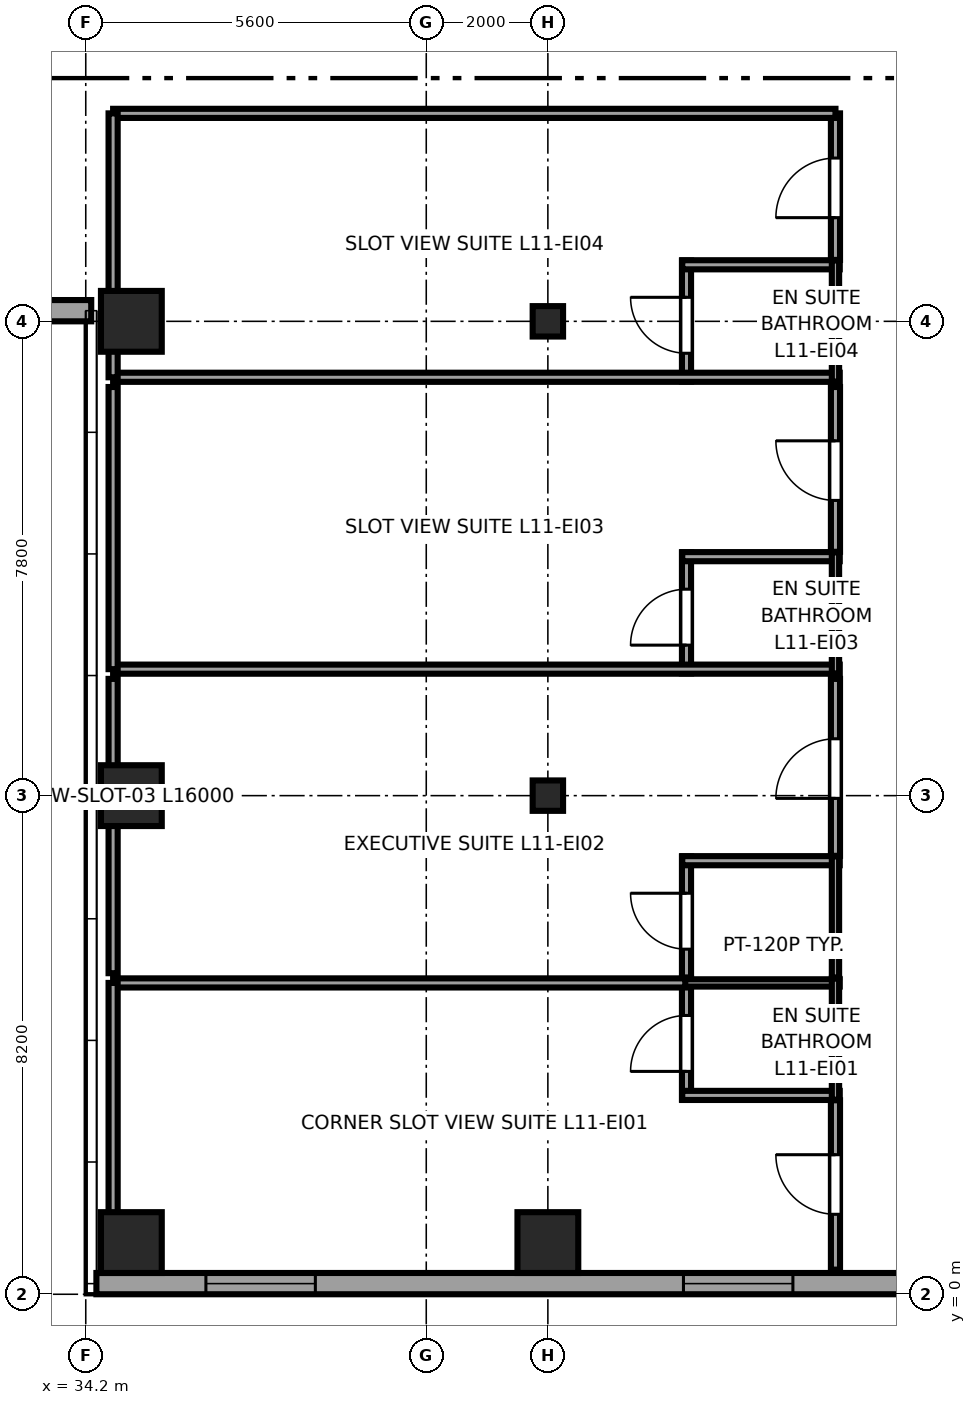
"""IFC4 building model, lengths in metres.
Left out: names, types, materials, properties, quantities, classifications, styles, units other than length and angle.
Written with IfcOpenShell. Run it as: python <this file> out.ifc"""

import sys

from ifc_helpers import new_model, si_unit, direction, frame, frame_2d, origin, origin_2d, place, context, subcontext, project, spatial, rectangle, i_section, extrude, source, transform, mapped, element, fill, save


model = new_model("IFC4")
c1 = context("Model", 3, precision=1e-05, world=origin(), true_north=direction((0.0, 1.0)))
c2 = subcontext(c1, "Body", "Model", "MODEL_VIEW")
j1 = project(units=[si_unit("LENGTHUNIT", "METRE"), si_unit("PLANEANGLEUNIT", "RADIAN")], contexts=[c1])
p1 = place(None, origin())
s1 = spatial("IfcSite", under=j1, at=p1, CompositionType="ELEMENT")
p2 = place(p1, origin())
s2 = spatial("IfcBuilding", under=s1, at=p2, CompositionType="ELEMENT")
p3 = place(p2, frame((0.0, 0.0, 49.75)))
s3 = spatial("IfcBuildingStorey", under=s2, at=p3, CompositionType="ELEMENT", Elevation=49.75)
m1 = source(origin(), c2, "Body", "SweptSolid", [
    extrude(rectangle(XDim=1.0, YDim=1.0, at=origin_2d()), origin(), (0.0, 0.0, 1.0), 3.55),
])
for number, where, z_axis, x_axis in (
    (1, (34.95, 0.85, 0.0), (0.0, 0.0, 1.0), (1.0, 0.0, 0.0)),
    (2, (34.95, 8.2, 0.0), (0.0, 0.0, 1.0), (1.0, 0.0, 0.0)),
    (3, (34.95, 16.0, 0.0), (0.0, 0.0, 1.0), (1.0, 0.0, 0.0)),
    (4, (41.8, 0.85, 0.0), (0.0, 0.0, 1.0), (1.0, 0.0, 0.0)),
):
    element("IfcColumn", number, at=place(p3, frame(where, z_axis=z_axis, x_axis=x_axis)), inside=s3, PredefinedType="COLUMN", context=c2, shape_type="MappedRepresentation", body=[
        mapped(m1, transform((0.0, 0.0, 0.0), x_axis=(1.0, 0.0, 0.0), y_axis=(0.0, 1.0, 0.0), z_axis=(0.0, 0.0, 1.0), scale=1.0)),
    ])
m2 = source(origin(), c2, "Body", "SweptSolid", [
    extrude(i_section(OverallWidth=0.5, OverallDepth=0.5, WebThickness=0.028, FlangeThickness=0.045, at=origin_2d()), origin(), (0.0, 0.0, 1.0), 3.55),
])
for number, where, z_axis, x_axis in (
    (5, (41.8, 8.2, 0.0), (0.0, 0.0, 1.0), (1.0, 0.0, 0.0)),
    (6, (41.8, 16.0, 0.0), (0.0, 0.0, 1.0), (1.0, 0.0, 0.0)),
):
    element("IfcColumn", number, at=place(p3, frame(where, z_axis=z_axis, x_axis=x_axis)), inside=s3, PredefinedType="COLUMN", context=c2, shape_type="MappedRepresentation", body=[
        mapped(m2, transform((0.0, 0.0, 0.0), x_axis=(1.0, 0.0, 0.0), y_axis=(0.0, 1.0, 0.0), z_axis=(0.0, 0.0, 1.0), scale=1.0)),
    ])
p4 = place(p3, frame((22.71, 16.175, 0.0), z_axis=(0.0, 0.0, 1.0), x_axis=(1.0, 0.0, 0.0)))
e7 = element("IfcWall", 7, at=p4, inside=s3, PredefinedType="SOLIDWALL", context=c2, shape_type="SweptSolid", body=[
    extrude(rectangle(XDim=11.58, YDim=0.35, at=frame_2d((5.79, 0.0))), origin(), (0.0, 0.0, 1.0), 2.748),
])
p5 = place(p4, frame((2.295, 0.0, 0.68)))
e8 = element("IfcOpeningElement", 8, at=p5, cuts=e7, PredefinedType="OPENING", context=c2, shape_type="SweptSolid", body=[
    extrude(rectangle(XDim=1.8, YDim=1.85, at=frame_2d((0.9, 0.925))), frame((0.0, 0.185, 0.0), z_axis=(0.0, -1.0, 0.0), x_axis=(1.0, 0.0, 0.0)), (0.0, 0.0, 1.0), 0.37),
])
p6 = place(p4, frame((7.485, 0.0, 0.68)))
e9 = element("IfcOpeningElement", 9, at=p6, cuts=e7, PredefinedType="OPENING", context=c2, shape_type="SweptSolid", body=[
    extrude(rectangle(XDim=1.8, YDim=1.85, at=frame_2d((0.9, 0.925))), frame((0.0, 0.185, 0.0), z_axis=(0.0, -1.0, 0.0), x_axis=(1.0, 0.0, 0.0)), (0.0, 0.0, 1.0), 0.37),
])
p7 = place(p3, frame((34.375, 0.175, 0.0), z_axis=(0.0, 0.0, 1.0), x_axis=(1.0, 0.0, 0.0)))
e10 = element("IfcWall", 10, at=p7, inside=s3, PredefinedType="SOLIDWALL", context=c2, shape_type="SweptSolid", body=[
    extrude(rectangle(XDim=18.008, YDim=0.35, at=frame_2d((9.004, 0.0))), origin(), (0.0, 0.0, 1.0), 3.37),
])
p8 = place(p7, frame((1.801, 0.0, 0.68)))
e11 = element("IfcOpeningElement", 11, at=p8, cuts=e10, PredefinedType="OPENING", context=c2, shape_type="SweptSolid", body=[
    extrude(rectangle(XDim=1.8, YDim=1.85, at=frame_2d((0.9, 0.925))), frame((0.0, 0.185, 0.0), z_axis=(0.0, -1.0, 0.0), x_axis=(1.0, 0.0, 0.0)), (0.0, 0.0, 1.0), 0.37),
])
p9 = place(p7, frame((9.655, 0.0, 0.68)))
e12 = element("IfcOpeningElement", 12, at=p9, cuts=e10, PredefinedType="OPENING", context=c2, shape_type="SweptSolid", body=[
    extrude(rectangle(XDim=1.8, YDim=1.85, at=frame_2d((0.9, 0.925))), frame((0.0, 0.185, 0.0), z_axis=(0.0, -1.0, 0.0), x_axis=(1.0, 0.0, 0.0)), (0.0, 0.0, 1.0), 0.37),
])
p10 = place(p7, frame((15.725, 0.0, 0.62)))
e13 = element("IfcOpeningElement", 13, at=p10, cuts=e10, PredefinedType="OPENING", context=c2, shape_type="SweptSolid", body=[
    extrude(rectangle(XDim=1.5, YDim=1.55, at=frame_2d((0.75, 0.775))), frame((0.0, 0.185, 0.0), z_axis=(0.0, -1.0, 0.0), x_axis=(1.0, 0.0, 0.0)), (0.0, 0.0, 1.0), 0.37),
])
p11 = place(p3, frame((44.08, 3.2, 0.0), z_axis=(0.0, 0.0, 1.0), x_axis=(0.0, 1.0, 0.0)))
e14 = element("IfcWall", 14, at=p11, inside=s3, PredefinedType="PARTITIONING", context=c2, shape_type="SweptSolid", body=[
    extrude(rectangle(XDim=1.99, YDim=0.15, at=frame_2d((0.995, 0.0))), origin(), (0.0, 0.0, 1.0), 3.37),
])
p12 = place(p11, frame((0.465, 0.0, 0.0)))
e15 = element("IfcOpeningElement", 15, at=p12, cuts=e14, PredefinedType="OPENING", context=c2, shape_type="SweptSolid", body=[
    extrude(rectangle(XDim=0.92, YDim=2.01, at=frame_2d((0.46, 1.005))), frame((0.0, 0.085, 0.0), z_axis=(0.0, -1.0, 0.0), x_axis=(1.0, 0.0, 0.0)), (0.0, 0.0, 1.0), 0.17),
])
p13 = place(p3, frame((44.01, 3.27, 0.0), z_axis=(0.0, 0.0, 1.0), x_axis=(1.0, 0.0, 0.0)))
e16 = element("IfcWall", 16, at=p13, inside=s3, PredefinedType="PARTITIONING", context=c2, shape_type="SweptSolid", body=[
    extrude(rectangle(XDim=2.59, YDim=0.15, at=frame_2d((1.295, 0.0))), origin(), (0.0, 0.0, 1.0), 3.37),
])
p14 = place(p3, frame((44.01, 5.12, 0.0), z_axis=(0.0, 0.0, 1.0), x_axis=(1.0, 0.0, 0.0)))
e17 = element("IfcWall", 17, at=p14, inside=s3, PredefinedType="PLUMBINGWALL", context=c2, shape_type="SweptSolid", body=[
    extrude(rectangle(XDim=2.59, YDim=0.12, at=frame_2d((1.295, 0.0))), origin(), (0.0, 0.0, 1.0), 3.37),
])
p15 = place(p3, frame((46.53, 3.2, 0.0), z_axis=(0.0, 0.0, 1.0), x_axis=(0.0, 1.0, 0.0)))
e18 = element("IfcWall", 18, at=p15, inside=s3, PredefinedType="PLUMBINGWALL", context=c2, shape_type="SweptSolid", body=[
    extrude(rectangle(XDim=1.99, YDim=0.12, at=frame_2d((0.995, 0.0))), origin(), (0.0, 0.0, 1.0), 3.37),
])
p16 = place(p3, frame((44.08, 5.21, 0.0), z_axis=(0.0, 0.0, 1.0), x_axis=(0.0, 1.0, 0.0)))
e19 = element("IfcWall", 19, at=p16, inside=s3, PredefinedType="PARTITIONING", context=c2, shape_type="SweptSolid", body=[
    extrude(rectangle(XDim=1.99, YDim=0.15, at=frame_2d((0.995, 0.0))), origin(), (0.0, 0.0, 1.0), 3.37),
])
p17 = place(p16, frame((0.465, 0.0, 0.0)))
e20 = element("IfcOpeningElement", 20, at=p17, cuts=e19, PredefinedType="OPENING", context=c2, shape_type="SweptSolid", body=[
    extrude(rectangle(XDim=0.92, YDim=2.01, at=frame_2d((0.46, 1.005))), frame((0.0, 0.085, 0.0), z_axis=(0.0, -1.0, 0.0), x_axis=(1.0, 0.0, 0.0)), (0.0, 0.0, 1.0), 0.17),
])
p18 = place(p3, frame((44.01, 7.13, 0.0), z_axis=(0.0, 0.0, 1.0), x_axis=(1.0, 0.0, 0.0)))
e21 = element("IfcWall", 21, at=p18, inside=s3, PredefinedType="PARTITIONING", context=c2, shape_type="SweptSolid", body=[
    extrude(rectangle(XDim=2.59, YDim=0.15, at=frame_2d((1.295, 0.0))), origin(), (0.0, 0.0, 1.0), 3.37),
])
p19 = place(p3, frame((46.53, 5.21, 0.0), z_axis=(0.0, 0.0, 1.0), x_axis=(0.0, 1.0, 0.0)))
e22 = element("IfcWall", 22, at=p19, inside=s3, PredefinedType="PLUMBINGWALL", context=c2, shape_type="SweptSolid", body=[
    extrude(rectangle(XDim=1.99, YDim=0.12, at=frame_2d((0.995, 0.0))), origin(), (0.0, 0.0, 1.0), 3.37),
])
p20 = place(p3, frame((44.08, 10.21, 0.0), z_axis=(0.0, 0.0, 1.0), x_axis=(0.0, 1.0, 0.0)))
e23 = element("IfcWall", 23, at=p20, inside=s3, PredefinedType="PARTITIONING", context=c2, shape_type="SweptSolid", body=[
    extrude(rectangle(XDim=1.99, YDim=0.15, at=frame_2d((0.995, 0.0))), origin(), (0.0, 0.0, 1.0), 3.37),
])
p21 = place(p20, frame((0.465, 0.0, 0.0)))
e24 = element("IfcOpeningElement", 24, at=p21, cuts=e23, PredefinedType="OPENING", context=c2, shape_type="SweptSolid", body=[
    extrude(rectangle(XDim=0.92, YDim=2.01, at=frame_2d((0.46, 1.005))), frame((0.0, 0.085, 0.0), z_axis=(0.0, -1.0, 0.0), x_axis=(1.0, 0.0, 0.0)), (0.0, 0.0, 1.0), 0.17),
])
p22 = place(p3, frame((34.65, 10.28, 0.0), z_axis=(0.0, 0.0, 1.0), x_axis=(1.0, 0.0, 0.0)))
e25 = element("IfcWall", 25, at=p22, inside=s3, PredefinedType="PARTITIONING", context=c2, shape_type="SweptSolid", body=[
    extrude(rectangle(XDim=11.95, YDim=0.15, at=frame_2d((5.975, 0.0))), origin(), (0.0, 0.0, 1.0), 3.37),
])
p23 = place(p3, frame((44.01, 12.13, 0.0), z_axis=(0.0, 0.0, 1.0), x_axis=(1.0, 0.0, 0.0)))
e26 = element("IfcWall", 26, at=p23, inside=s3, PredefinedType="PARTITIONING", context=c2, shape_type="SweptSolid", body=[
    extrude(rectangle(XDim=2.59, YDim=0.15, at=frame_2d((1.295, 0.0))), origin(), (0.0, 0.0, 1.0), 3.37),
])
p24 = place(p3, frame((46.53, 10.21, 0.0), z_axis=(0.0, 0.0, 1.0), x_axis=(0.0, 1.0, 0.0)))
e27 = element("IfcWall", 27, at=p24, inside=s3, PredefinedType="PLUMBINGWALL", context=c2, shape_type="SweptSolid", body=[
    extrude(rectangle(XDim=1.99, YDim=0.12, at=frame_2d((0.995, 0.0))), origin(), (0.0, 0.0, 1.0), 3.37),
])
p25 = place(p3, frame((44.08, 15.01, 0.0), z_axis=(0.0, 0.0, 1.0), x_axis=(0.0, 1.0, 0.0)))
e28 = element("IfcWall", 28, at=p25, inside=s3, PredefinedType="PARTITIONING", context=c2, shape_type="SweptSolid", body=[
    extrude(rectangle(XDim=1.99, YDim=0.15, at=frame_2d((0.995, 0.0))), origin(), (0.0, 0.0, 1.0), 3.37),
])
p26 = place(p25, frame((0.465, 0.0, 0.0)))
e29 = element("IfcOpeningElement", 29, at=p26, cuts=e28, PredefinedType="OPENING", context=c2, shape_type="SweptSolid", body=[
    extrude(rectangle(XDim=0.92, YDim=2.01, at=frame_2d((0.46, 1.005))), frame((0.0, 0.085, 0.0), z_axis=(0.0, -1.0, 0.0), x_axis=(1.0, 0.0, 0.0)), (0.0, 0.0, 1.0), 0.17),
])
p27 = place(p3, frame((34.65, 15.08, 0.0), z_axis=(0.0, 0.0, 1.0), x_axis=(1.0, 0.0, 0.0)))
e30 = element("IfcWall", 30, at=p27, inside=s3, PredefinedType="PARTITIONING", context=c2, shape_type="SweptSolid", body=[
    extrude(rectangle(XDim=11.95, YDim=0.15, at=frame_2d((5.975, 0.0))), origin(), (0.0, 0.0, 1.0), 3.37),
])
p28 = place(p3, frame((44.01, 16.93, 0.0), z_axis=(0.0, 0.0, 1.0), x_axis=(1.0, 0.0, 0.0)))
e31 = element("IfcWall", 31, at=p28, inside=s3, PredefinedType="PARTITIONING", context=c2, shape_type="SweptSolid", body=[
    extrude(rectangle(XDim=2.59, YDim=0.15, at=frame_2d((1.295, 0.0))), origin(), (0.0, 0.0, 1.0), 3.37),
])
p29 = place(p3, frame((46.53, 15.01, 0.0), z_axis=(0.0, 0.0, 1.0), x_axis=(0.0, 1.0, 0.0)))
e32 = element("IfcWall", 32, at=p29, inside=s3, PredefinedType="PLUMBINGWALL", context=c2, shape_type="SweptSolid", body=[
    extrude(rectangle(XDim=1.99, YDim=0.12, at=frame_2d((0.995, 0.0))), origin(), (0.0, 0.0, 1.0), 3.37),
])
p30 = place(p3, frame((46.53, 0.405, 0.0), z_axis=(0.0, 0.0, 1.0), x_axis=(0.0, 1.0, 0.0)))
e33 = element("IfcWall", 33, at=p30, inside=s3, PredefinedType="PARTITIONING", context=c2, shape_type="SweptSolid", body=[
    extrude(rectangle(XDim=2.785, YDim=0.15, at=frame_2d((1.393, 0.0))), origin(), (0.0, 0.0, 1.0), 3.37),
])
p31 = place(p30, frame((0.91, 0.0, 0.0)))
e34 = element("IfcOpeningElement", 34, at=p31, cuts=e33, PredefinedType="OPENING", context=c2, shape_type="SweptSolid", body=[
    extrude(rectangle(XDim=0.98, YDim=2.12, at=frame_2d((0.49, 1.06))), frame((0.0, 0.085, 0.0), z_axis=(0.0, -1.0, 0.0), x_axis=(1.0, 0.0, 0.0)), (0.0, 0.0, 1.0), 0.17),
])
p32 = place(p3, frame((34.65, 5.12, 0.0), z_axis=(0.0, 0.0, 1.0), x_axis=(1.0, 0.0, 0.0)))
e35 = element("IfcWall", 35, at=p32, inside=s3, PredefinedType="PARTITIONING", context=c2, shape_type="SweptSolid", body=[
    extrude(rectangle(XDim=9.41, YDim=0.15, at=frame_2d((4.705, 0.0))), origin(), (0.0, 0.0, 1.0), 3.37),
])
p33 = place(p3, frame((34.65, 0.405, 0.0), z_axis=(0.0, 0.0, 1.0), x_axis=(0.0, 1.0, 0.0)))
e36 = element("IfcWall", 36, at=p33, inside=s3, PredefinedType="PARTITIONING", context=c2, shape_type="SweptSolid", body=[
    extrude(rectangle(XDim=4.715, YDim=0.15, at=frame_2d((2.357, 0.0))), origin(), (0.0, 0.0, 1.0), 3.37),
])
p34 = place(p3, frame((46.53, 7.21, 0.0), z_axis=(0.0, 0.0, 1.0), x_axis=(0.0, 1.0, 0.0)))
e37 = element("IfcWall", 37, at=p34, inside=s3, PredefinedType="PARTITIONING", context=c2, shape_type="SweptSolid", body=[
    extrude(rectangle(XDim=2.91, YDim=0.15, at=frame_2d((1.455, 0.0))), origin(), (0.0, 0.0, 1.0), 3.37),
])
p35 = place(p34, frame((0.945, 0.0, 0.0)))
e38 = element("IfcOpeningElement", 38, at=p35, cuts=e37, PredefinedType="OPENING", context=c2, shape_type="SweptSolid", body=[
    extrude(rectangle(XDim=0.98, YDim=2.12, at=frame_2d((0.49, 1.06))), frame((0.0, 0.085, 0.0), z_axis=(0.0, -1.0, 0.0), x_axis=(1.0, 0.0, 0.0)), (0.0, 0.0, 1.0), 0.17),
])
p36 = place(p3, frame((34.65, 5.28, 0.0), z_axis=(0.0, 0.0, 1.0), x_axis=(0.0, 1.0, 0.0)))
e39 = element("IfcWall", 39, at=p36, inside=s3, PredefinedType="PARTITIONING", context=c2, shape_type="SweptSolid", body=[
    extrude(rectangle(XDim=4.84, YDim=0.15, at=frame_2d((2.42, 0.0))), origin(), (0.0, 0.0, 1.0), 3.37),
])
p37 = place(p3, frame((46.53, 12.21, 0.0), z_axis=(0.0, 0.0, 1.0), x_axis=(0.0, 1.0, 0.0)))
e40 = element("IfcWall", 40, at=p37, inside=s3, PredefinedType="PARTITIONING", context=c2, shape_type="SweptSolid", body=[
    extrude(rectangle(XDim=2.71, YDim=0.15, at=frame_2d((1.355, 0.0))), origin(), (0.0, 0.0, 1.0), 3.37),
])
p38 = place(p37, frame((0.845, 0.0, 0.0)))
e41 = element("IfcOpeningElement", 41, at=p38, cuts=e40, PredefinedType="OPENING", context=c2, shape_type="SweptSolid", body=[
    extrude(rectangle(XDim=0.98, YDim=2.12, at=frame_2d((0.49, 1.06))), frame((0.0, 0.085, 0.0), z_axis=(0.0, -1.0, 0.0), x_axis=(1.0, 0.0, 0.0)), (0.0, 0.0, 1.0), 0.17),
])
p39 = place(p3, frame((34.65, 10.28, 0.0), z_axis=(0.0, 0.0, 1.0), x_axis=(0.0, 1.0, 0.0)))
e42 = element("IfcWall", 42, at=p39, inside=s3, PredefinedType="PARTITIONING", context=c2, shape_type="SweptSolid", body=[
    extrude(rectangle(XDim=4.64, YDim=0.15, at=frame_2d((2.32, 0.0))), origin(), (0.0, 0.0, 1.0), 3.37),
])
p40 = place(p3, frame((46.53, 17.01, 0.0), z_axis=(0.0, 0.0, 1.0), x_axis=(0.0, 1.0, 0.0)))
e43 = element("IfcWall", 43, at=p40, inside=s3, PredefinedType="PARTITIONING", context=c2, shape_type="SweptSolid", body=[
    extrude(rectangle(XDim=2.41, YDim=0.15, at=frame_2d((1.205, 0.0))), origin(), (0.0, 0.0, 1.0), 3.37),
])
p41 = place(p40, frame((0.695, 0.0, 0.0)))
e44 = element("IfcOpeningElement", 44, at=p41, cuts=e43, PredefinedType="OPENING", context=c2, shape_type="SweptSolid", body=[
    extrude(rectangle(XDim=0.98, YDim=2.12, at=frame_2d((0.49, 1.06))), frame((0.0, 0.085, 0.0), z_axis=(0.0, -1.0, 0.0), x_axis=(1.0, 0.0, 0.0)), (0.0, 0.0, 1.0), 0.17),
])
p42 = place(p3, frame((34.65, 19.42, 0.0), z_axis=(0.0, 0.0, 1.0), x_axis=(1.0, 0.0, 0.0)))
e45 = element("IfcWall", 45, at=p42, inside=s3, PredefinedType="PARTITIONING", context=c2, shape_type="SweptSolid", body=[
    extrude(rectangle(XDim=11.88, YDim=0.15, at=frame_2d((5.94, 0.0))), origin(), (0.0, 0.0, 1.0), 3.37),
])
p43 = place(p3, frame((34.65, 15.08, 0.0), z_axis=(0.0, 0.0, 1.0), x_axis=(0.0, 1.0, 0.0)))
e46 = element("IfcWall", 46, at=p43, inside=s3, PredefinedType="PARTITIONING", context=c2, shape_type="SweptSolid", body=[
    extrude(rectangle(XDim=4.34, YDim=0.15, at=frame_2d((2.17, 0.0))), origin(), (0.0, 0.0, 1.0), 3.37),
])
m3 = source(origin(), c2, "Body", "SweptSolid", [
    extrude(rectangle(XDim=1.8, YDim=1.85, at=frame_2d((0.9, 0.925))), frame((0.0, 0.09, 0.0), z_axis=(0.0, -1.0, 0.0), x_axis=(1.0, 0.0, 0.0)), (0.0, 0.0, 1.0), 0.06),
])
p44 = place(p8, origin())
e47 = element("IfcWindow", 47, at=p44, inside=s3, PartitioningType="TRIPLE_PANEL_HORIZONTAL", PredefinedType="WINDOW", context=c2, shape_type="MappedRepresentation", body=[
    mapped(m3, transform((0.0, 0.0, 0.0), x_axis=(1.0, 0.0, 0.0), y_axis=(0.0, 1.0, 0.0), z_axis=(0.0, 0.0, 1.0), scale=1.0)),
])
fill(e11, e47)
p45 = place(p9, origin())
e48 = element("IfcWindow", 48, at=p45, inside=s3, PartitioningType="TRIPLE_PANEL_HORIZONTAL", PredefinedType="WINDOW", context=c2, shape_type="MappedRepresentation", body=[
    mapped(m3, transform((0.0, 0.0, 0.0), x_axis=(1.0, 0.0, 0.0), y_axis=(0.0, 1.0, 0.0), z_axis=(0.0, 0.0, 1.0), scale=1.0)),
])
fill(e12, e48)
m4 = source(origin(), c2, "Body", "SweptSolid", [
    extrude(rectangle(XDim=0.92, YDim=2.01, at=frame_2d((0.46, 1.005))), frame((0.0, 0.025, 0.0), z_axis=(0.0, -1.0, 0.0), x_axis=(1.0, 0.0, 0.0)), (0.0, 0.0, 1.0), 0.05),
])
p46 = place(p12, origin())
e49 = element("IfcDoor", 49, at=p46, inside=s3, OperationType="SINGLE_SWING_LEFT", PredefinedType="DOOR", context=c2, shape_type="MappedRepresentation", body=[
    mapped(m4, transform((0.0, 0.0, 0.0), x_axis=(1.0, 0.0, 0.0), y_axis=(0.0, 1.0, 0.0), z_axis=(0.0, 0.0, 1.0), scale=1.0)),
])
fill(e15, e49)
p47 = place(p17, origin())
e50 = element("IfcDoor", 50, at=p47, inside=s3, OperationType="SINGLE_SWING_RIGHT", PredefinedType="DOOR", context=c2, shape_type="MappedRepresentation", body=[
    mapped(m4, transform((0.0, 0.0, 0.0), x_axis=(1.0, 0.0, 0.0), y_axis=(0.0, 1.0, 0.0), z_axis=(0.0, 0.0, 1.0), scale=1.0)),
])
fill(e20, e50)
p48 = place(p21, origin())
e51 = element("IfcDoor", 51, at=p48, inside=s3, OperationType="SINGLE_SWING_LEFT", PredefinedType="DOOR", context=c2, shape_type="MappedRepresentation", body=[
    mapped(m4, transform((0.0, 0.0, 0.0), x_axis=(1.0, 0.0, 0.0), y_axis=(0.0, 1.0, 0.0), z_axis=(0.0, 0.0, 1.0), scale=1.0)),
])
fill(e24, e51)
p49 = place(p26, origin())
e52 = element("IfcDoor", 52, at=p49, inside=s3, OperationType="SINGLE_SWING_RIGHT", PredefinedType="DOOR", context=c2, shape_type="MappedRepresentation", body=[
    mapped(m4, transform((0.0, 0.0, 0.0), x_axis=(1.0, 0.0, 0.0), y_axis=(0.0, 1.0, 0.0), z_axis=(0.0, 0.0, 1.0), scale=1.0)),
])
fill(e29, e52)
m5 = source(origin(), c2, "Body", "SweptSolid", [
    extrude(rectangle(XDim=0.98, YDim=2.12, at=frame_2d((0.49, 1.06))), frame((0.0, 0.025, 0.0), z_axis=(0.0, -1.0, 0.0), x_axis=(1.0, 0.0, 0.0)), (0.0, 0.0, 1.0), 0.05),
])
p50 = place(p31, origin())
e53 = element("IfcDoor", 53, at=p50, inside=s3, OperationType="SINGLE_SWING_RIGHT", PredefinedType="DOOR", context=c2, shape_type="MappedRepresentation", body=[
    mapped(m5, transform((0.0, 0.0, 0.0), x_axis=(1.0, 0.0, 0.0), y_axis=(0.0, 1.0, 0.0), z_axis=(0.0, 0.0, 1.0), scale=1.0)),
])
fill(e34, e53)
p51 = place(p35, origin())
e54 = element("IfcDoor", 54, at=p51, inside=s3, OperationType="SINGLE_SWING_LEFT", PredefinedType="DOOR", context=c2, shape_type="MappedRepresentation", body=[
    mapped(m5, transform((0.0, 0.0, 0.0), x_axis=(1.0, 0.0, 0.0), y_axis=(0.0, 1.0, 0.0), z_axis=(0.0, 0.0, 1.0), scale=1.0)),
])
fill(e38, e54)
p52 = place(p38, origin())
e55 = element("IfcDoor", 55, at=p52, inside=s3, OperationType="SINGLE_SWING_RIGHT", PredefinedType="DOOR", context=c2, shape_type="MappedRepresentation", body=[
    mapped(m5, transform((0.0, 0.0, 0.0), x_axis=(1.0, 0.0, 0.0), y_axis=(0.0, 1.0, 0.0), z_axis=(0.0, 0.0, 1.0), scale=1.0)),
])
fill(e41, e55)
p53 = place(p41, origin())
e56 = element("IfcDoor", 56, at=p53, inside=s3, OperationType="SINGLE_SWING_LEFT", PredefinedType="DOOR", context=c2, shape_type="MappedRepresentation", body=[
    mapped(m5, transform((0.0, 0.0, 0.0), x_axis=(1.0, 0.0, 0.0), y_axis=(0.0, 1.0, 0.0), z_axis=(0.0, 0.0, 1.0), scale=1.0)),
])
fill(e44, e56)
save(model, sys.argv[1])
